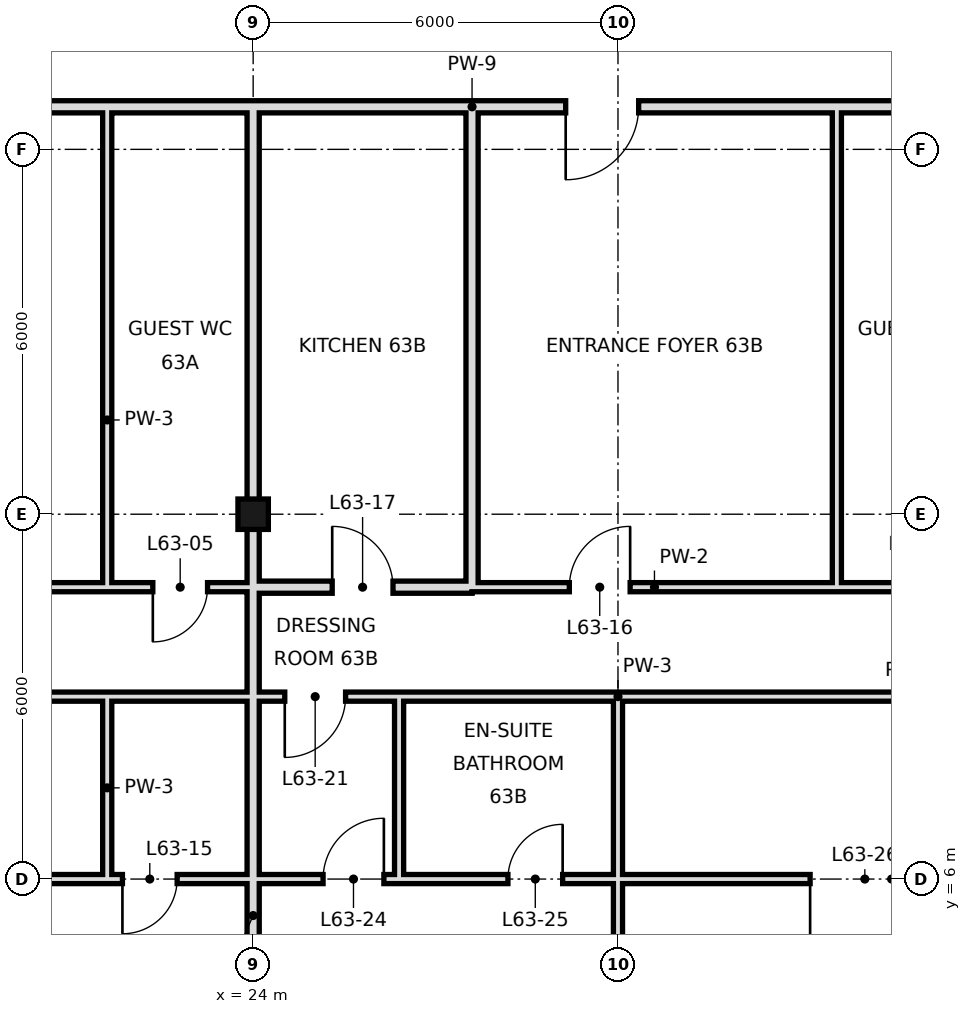
"""IFC4 building model, lengths in metres.
Left out: names, types, materials, properties, quantities, classifications, styles, units other than length and angle.
Written with IfcOpenShell. Run it as: python <this file> out.ifc"""

import sys

from ifc_helpers import new_model, si_unit, direction, frame, frame_2d, origin, origin_2d, place, context, subcontext, project, spatial, rectangle, hollow_rectangle, extrude, element, fill, save


model = new_model("IFC4")
c1 = context("Model", 3, precision=1e-05, world=origin(), true_north=direction((0.0, 1.0)))
c2 = subcontext(c1, "Body", "Model", "MODEL_VIEW")
j1 = project(units=[si_unit("LENGTHUNIT", "METRE"), si_unit("PLANEANGLEUNIT", "RADIAN")], contexts=[c1])
p1 = place(None, origin())
s1 = spatial("IfcSite", under=j1, at=p1, CompositionType="ELEMENT")
p2 = place(p1, origin())
s2 = spatial("IfcBuilding", under=s1, at=p2, CompositionType="ELEMENT")
p3 = place(p2, frame((0.0, 0.0, 266.6)))
s3 = spatial("IfcBuildingStorey", under=s2, at=p3, CompositionType="ELEMENT", Elevation=266.6)
p4 = place(p3, frame((24.0, 12.0, 0.0), z_axis=(0.0, 0.0, 1.0), x_axis=(1.0, 0.0, 0.0)))
e1 = element("IfcColumn", 1, at=p4, inside=s3, PredefinedType="COLUMN", context=c2, shape_type="SweptSolid", body=[
    extrude(hollow_rectangle(XDim=0.5, YDim=0.5, WallThickness=0.025, at=origin_2d()), origin(), (0.0, 0.0, 1.0), 3.6),
])
p5 = place(p3, frame((21.6, 6.0, 0.0), z_axis=(0.0, 0.0, 1.0), x_axis=(0.0, 1.0, 0.0)))
e2 = element("IfcWall", 2, at=p5, inside=s3, PredefinedType="PARTITIONING", context=c2, shape_type="SweptSolid", body=[
    extrude(rectangle(XDim=3.0, YDim=0.15, at=frame_2d((1.5, 0.0))), origin(), (0.0, 0.0, 1.0), 3.42),
])
p6 = place(p3, frame((21.6, 10.8, 0.0), z_axis=(0.0, 0.0, 1.0), x_axis=(0.0, 1.0, 0.0)))
e3 = element("IfcWall", 3, at=p6, inside=s3, PredefinedType="PARTITIONING", context=c2, shape_type="SweptSolid", body=[
    extrude(rectangle(XDim=7.9, YDim=0.15, at=frame_2d((3.95, 0.0))), origin(), (0.0, 0.0, 1.0), 3.42),
])
p7 = place(p3, frame((24.0, 10.8, 0.0), z_axis=(0.0, 0.0, 1.0), x_axis=(0.0, 1.0, 0.0)))
e4 = element("IfcWall", 4, at=p7, inside=s3, PredefinedType="SOLIDWALL", context=c2, shape_type="SweptSolid", body=[
    extrude(rectangle(XDim=7.9, YDim=0.2, at=frame_2d((3.95, 0.0))), origin(), (0.0, 0.0, 1.0), 2.72),
])
p8 = place(p3, frame((24.0, 0.0, 0.0), z_axis=(0.0, 0.0, 1.0), x_axis=(0.0, 1.0, 0.0)))
e5 = element("IfcWall", 5, at=p8, inside=s3, PredefinedType="SOLIDWALL", context=c2, shape_type="SweptSolid", body=[
    extrude(rectangle(XDim=10.8, YDim=0.2, at=frame_2d((5.4, 0.0))), origin(), (0.0, 0.0, 1.0), 2.72),
])
p9 = place(p3, frame((26.4, 6.0, 0.0), z_axis=(0.0, 0.0, 1.0), x_axis=(0.0, 1.0, 0.0)))
e6 = element("IfcWall", 6, at=p9, inside=s3, PredefinedType="PARTITIONING", context=c2, shape_type="SweptSolid", body=[
    extrude(rectangle(XDim=3.0, YDim=0.15, at=frame_2d((1.5, 0.0))), origin(), (0.0, 0.0, 1.0), 3.42),
])
p10 = place(p3, frame((27.6, 10.8, 0.0), z_axis=(0.0, 0.0, 1.0), x_axis=(0.0, 1.0, 0.0)))
e7 = element("IfcWall", 7, at=p10, inside=s3, PredefinedType="SOLIDWALL", context=c2, shape_type="SweptSolid", body=[
    extrude(rectangle(XDim=7.9, YDim=0.2, at=frame_2d((3.95, 0.0))), origin(), (0.0, 0.0, 1.0), 2.72),
])
p11 = place(p3, frame((30.0, -0.6, 0.0), z_axis=(0.0, 0.0, 1.0), x_axis=(0.0, 1.0, 0.0)))
e8 = element("IfcWall", 8, at=p11, inside=s3, PredefinedType="PARTITIONING", context=c2, shape_type="SweptSolid", body=[
    extrude(rectangle(XDim=6.6, YDim=0.15, at=frame_2d((3.3, 0.0))), origin(), (0.0, 0.0, 1.0), 2.72),
])
p12 = place(p3, frame((30.0, 6.0, 0.0), z_axis=(0.0, 0.0, 1.0), x_axis=(0.0, 1.0, 0.0)))
e9 = element("IfcWall", 9, at=p12, inside=s3, PredefinedType="PARTITIONING", context=c2, shape_type="SweptSolid", body=[
    extrude(rectangle(XDim=3.0, YDim=0.15, at=frame_2d((1.5, 0.0))), origin(), (0.0, 0.0, 1.0), 2.72),
])
p13 = place(p3, frame((33.6, 10.8, 0.0), z_axis=(0.0, 0.0, 1.0), x_axis=(0.0, 1.0, 0.0)))
e10 = element("IfcWall", 10, at=p13, inside=s3, PredefinedType="PARTITIONING", context=c2, shape_type="SweptSolid", body=[
    extrude(rectangle(XDim=7.9, YDim=0.15, at=frame_2d((3.95, 0.0))), origin(), (0.0, 0.0, 1.0), 3.42),
])
p14 = place(p3, frame((24.0, 10.8, 0.0), z_axis=(0.0, 0.0, 1.0), x_axis=(1.0, 0.0, 0.0)))
e11 = element("IfcWall", 11, at=p14, inside=s3, PredefinedType="SOLIDWALL", context=c2, shape_type="SweptSolid", body=[
    extrude(rectangle(XDim=3.6, YDim=0.2, at=frame_2d((1.8, 0.0))), origin(), (0.0, 0.0, 1.0), 2.72),
])
p15 = place(p14, frame((1.3, 0.0, 0.0)))
e12 = element("IfcOpeningElement", 12, at=p15, cuts=e11, PredefinedType="OPENING", context=c2, shape_type="SweptSolid", body=[
    extrude(rectangle(XDim=1.0, YDim=2.4, at=frame_2d((0.5, 1.2))), frame((0.0, 0.11, 0.0), z_axis=(0.0, -1.0, 0.0), x_axis=(1.0, 0.0, 0.0)), (0.0, 0.0, 1.0), 0.22),
])
p16 = place(p3, frame((-6.6, 10.8, 0.0), z_axis=(0.0, 0.0, 1.0), x_axis=(1.0, 0.0, 0.0)))
e13 = element("IfcWall", 13, at=p16, inside=s3, PredefinedType="PARTITIONING", context=c2, shape_type="SweptSolid", body=[
    extrude(rectangle(XDim=28.2, YDim=0.15, at=frame_2d((14.1, 0.0))), origin(), (0.0, 0.0, 1.0), 3.42),
])
p17 = place(p16, frame((25.6, 0.0, 0.0)))
e14 = element("IfcOpeningElement", 14, at=p17, cuts=e13, PredefinedType="OPENING", context=c2, shape_type="SweptSolid", body=[
    extrude(rectangle(XDim=1.0, YDim=2.4, at=frame_2d((0.5, 1.2))), frame((0.0, 0.085, 0.0), z_axis=(0.0, -1.0, 0.0), x_axis=(1.0, 0.0, 0.0)), (0.0, 0.0, 1.0), 0.17),
])
p18 = place(p16, frame((4.6, 0.0, 0.0)))
e15 = element("IfcOpeningElement", 15, at=p18, cuts=e13, PredefinedType="OPENING", context=c2, shape_type="SweptSolid", body=[
    extrude(rectangle(XDim=1.0, YDim=2.4, at=frame_2d((0.5, 1.2))), frame((0.0, 0.085, 0.0), z_axis=(0.0, -1.0, 0.0), x_axis=(1.0, 0.0, 0.0)), (0.0, 0.0, 1.0), 0.17),
])
p19 = place(p16, frame((15.7, 0.0, 0.0)))
e16 = element("IfcOpeningElement", 16, at=p19, cuts=e13, PredefinedType="OPENING", context=c2, shape_type="SweptSolid", body=[
    extrude(rectangle(XDim=1.0, YDim=2.4, at=frame_2d((0.5, 1.2))), frame((0.0, 0.085, 0.0), z_axis=(0.0, -1.0, 0.0), x_axis=(1.0, 0.0, 0.0)), (0.0, 0.0, 1.0), 0.17),
])
p20 = place(p3, frame((27.6, 10.8, 0.0), z_axis=(0.0, 0.0, 1.0), x_axis=(1.0, 0.0, 0.0)))
e17 = element("IfcWall", 17, at=p20, inside=s3, PredefinedType="PARTITIONING", context=c2, shape_type="SweptSolid", body=[
    extrude(rectangle(XDim=6.0, YDim=0.15, at=frame_2d((3.0, 0.0))), origin(), (0.0, 0.0, 1.0), 3.42),
])
p21 = place(p20, frame((1.6, 0.0, 0.0)))
e18 = element("IfcOpeningElement", 18, at=p21, cuts=e17, PredefinedType="OPENING", context=c2, shape_type="SweptSolid", body=[
    extrude(rectangle(XDim=1.0, YDim=2.4, at=frame_2d((0.5, 1.2))), frame((0.0, 0.085, 0.0), z_axis=(0.0, -1.0, 0.0), x_axis=(1.0, 0.0, 0.0)), (0.0, 0.0, 1.0), 0.17),
])
p22 = place(p3, frame((21.6, 10.8, 0.0), z_axis=(0.0, 0.0, 1.0), x_axis=(1.0, 0.0, 0.0)))
e19 = element("IfcWall", 19, at=p22, inside=s3, PredefinedType="PARTITIONING", context=c2, shape_type="SweptSolid", body=[
    extrude(rectangle(XDim=2.4, YDim=0.15, at=frame_2d((1.2, 0.0))), origin(), (0.0, 0.0, 1.0), 3.42),
])
p23 = place(p22, frame((0.75, 0.0, 0.0)))
e20 = element("IfcOpeningElement", 20, at=p23, cuts=e19, PredefinedType="OPENING", context=c2, shape_type="SweptSolid", body=[
    extrude(rectangle(XDim=0.9, YDim=2.4, at=frame_2d((0.45, 1.2))), frame((0.0, 0.085, 0.0), z_axis=(0.0, -1.0, 0.0), x_axis=(1.0, 0.0, 0.0)), (0.0, 0.0, 1.0), 0.17),
])
p24 = place(p3, frame((33.6, 10.8, 0.0), z_axis=(0.0, 0.0, 1.0), x_axis=(1.0, 0.0, 0.0)))
e21 = element("IfcWall", 21, at=p24, inside=s3, PredefinedType="PARTITIONING", context=c2, shape_type="SweptSolid", body=[
    extrude(rectangle(XDim=2.4, YDim=0.15, at=frame_2d((1.2, 0.0))), origin(), (0.0, 0.0, 1.0), 3.42),
])
p25 = place(p24, frame((0.95, 0.0, 0.0)))
e22 = element("IfcOpeningElement", 22, at=p25, cuts=e21, PredefinedType="OPENING", context=c2, shape_type="SweptSolid", body=[
    extrude(rectangle(XDim=0.9, YDim=2.4, at=frame_2d((0.45, 1.2))), frame((0.0, 0.085, 0.0), z_axis=(0.0, -1.0, 0.0), x_axis=(1.0, 0.0, 0.0)), (0.0, 0.0, 1.0), 0.17),
])
p26 = place(p3, frame((3.1, 18.7, 0.0), z_axis=(0.0, 0.0, 1.0), x_axis=(1.0, 0.0, 0.0)))
e23 = element("IfcWall", 23, at=p26, inside=s3, PredefinedType="SOLIDWALL", context=c2, shape_type="SweptSolid", body=[
    extrude(rectangle(XDim=20.9, YDim=0.2, at=frame_2d((10.45, 0.0))), origin(), (0.0, 0.0, 1.0), 2.72),
])
p27 = place(p26, frame((14.9, 0.0, 0.0)))
e24 = element("IfcOpeningElement", 24, at=p27, cuts=e23, PredefinedType="OPENING", context=c2, shape_type="SweptSolid", body=[
    extrude(rectangle(XDim=1.2, YDim=2.4, at=frame_2d((0.6, 1.2))), frame((0.0, 0.11, 0.0), z_axis=(0.0, -1.0, 0.0), x_axis=(1.0, 0.0, 0.0)), (0.0, 0.0, 1.0), 0.22),
])
p28 = place(p3, frame((27.6, 18.7, 0.0), z_axis=(0.0, 0.0, 1.0), x_axis=(1.0, 0.0, 0.0)))
e25 = element("IfcWall", 25, at=p28, inside=s3, PredefinedType="SOLIDWALL", context=c2, shape_type="SweptSolid", body=[
    extrude(rectangle(XDim=17.3, YDim=0.2, at=frame_2d((8.65, 0.0))), origin(), (0.0, 0.0, 1.0), 2.72),
])
p29 = place(p28, frame((1.54, 0.0, 0.0)))
e26 = element("IfcOpeningElement", 26, at=p29, cuts=e25, PredefinedType="OPENING", context=c2, shape_type="SweptSolid", body=[
    extrude(rectangle(XDim=1.2, YDim=2.4, at=frame_2d((0.6, 1.2))), frame((0.0, 0.11, 0.0), z_axis=(0.0, -1.0, 0.0), x_axis=(1.0, 0.0, 0.0)), (0.0, 0.0, 1.0), 0.22),
])
p30 = place(p3, frame((24.0, 18.7, 0.0), z_axis=(0.0, 0.0, 1.0), x_axis=(1.0, 0.0, 0.0)))
e27 = element("IfcWall", 27, at=p30, inside=s3, PredefinedType="SOLIDWALL", context=c2, shape_type="SweptSolid", body=[
    extrude(rectangle(XDim=3.6, YDim=0.2, at=frame_2d((1.8, 0.0))), origin(), (0.0, 0.0, 1.0), 3.42),
])
p31 = place(p3, frame((6.0, 6.0, 0.0), z_axis=(0.0, 0.0, 1.0), x_axis=(1.0, 0.0, 0.0)))
e28 = element("IfcWall", 28, at=p31, inside=s3, PredefinedType="PARTITIONING", context=c2, shape_type="SweptSolid", body=[
    extrude(rectangle(XDim=15.6, YDim=0.15, at=frame_2d((7.8, 0.0))), origin(), (0.0, 0.0, 1.0), 2.97),
])
p32 = place(p31, frame((7.04, 0.0, 0.0)))
e29 = element("IfcOpeningElement", 29, at=p32, cuts=e28, PredefinedType="OPENING", context=c2, shape_type="SweptSolid", body=[
    extrude(rectangle(XDim=1.8, YDim=2.4, at=frame_2d((0.9, 1.2))), frame((0.0, 0.085, 0.0), z_axis=(0.0, -1.0, 0.0), x_axis=(1.0, 0.0, 0.0)), (0.0, 0.0, 1.0), 0.17),
])
p33 = place(p31, frame((12.88, 0.0, 0.0)))
e30 = element("IfcOpeningElement", 30, at=p33, cuts=e28, PredefinedType="OPENING", context=c2, shape_type="SweptSolid", body=[
    extrude(rectangle(XDim=1.0, YDim=2.4, at=frame_2d((0.5, 1.2))), frame((0.0, 0.085, 0.0), z_axis=(0.0, -1.0, 0.0), x_axis=(1.0, 0.0, 0.0)), (0.0, 0.0, 1.0), 0.17),
])
p34 = place(p3, frame((24.0, 6.0, 0.0), z_axis=(0.0, 0.0, 1.0), x_axis=(1.0, 0.0, 0.0)))
e31 = element("IfcWall", 31, at=p34, inside=s3, PredefinedType="PARTITIONING", context=c2, shape_type="SweptSolid", body=[
    extrude(rectangle(XDim=2.4, YDim=0.15, at=frame_2d((1.2, 0.0))), origin(), (0.0, 0.0, 1.0), 2.97),
])
p35 = place(p34, frame((1.15, 0.0, 0.0)))
e32 = element("IfcOpeningElement", 32, at=p35, cuts=e31, PredefinedType="OPENING", context=c2, shape_type="SweptSolid", body=[
    extrude(rectangle(XDim=1.0, YDim=2.4, at=frame_2d((0.5, 1.2))), frame((0.0, 0.085, 0.0), z_axis=(0.0, -1.0, 0.0), x_axis=(1.0, 0.0, 0.0)), (0.0, 0.0, 1.0), 0.17),
])
p36 = place(p3, frame((30.0, 6.0, 0.0), z_axis=(0.0, 0.0, 1.0), x_axis=(1.0, 0.0, 0.0)))
e33 = element("IfcWall", 33, at=p36, inside=s3, PredefinedType="PARTITIONING", context=c2, shape_type="SweptSolid", body=[
    extrude(rectangle(XDim=15.6, YDim=0.15, at=frame_2d((7.8, 0.0))), origin(), (0.0, 0.0, 1.0), 2.97),
])
p37 = place(p36, frame((3.16, 0.0, 0.0)))
e34 = element("IfcOpeningElement", 34, at=p37, cuts=e33, PredefinedType="OPENING", context=c2, shape_type="SweptSolid", body=[
    extrude(rectangle(XDim=1.8, YDim=2.4, at=frame_2d((0.9, 1.2))), frame((0.0, 0.085, 0.0), z_axis=(0.0, -1.0, 0.0), x_axis=(1.0, 0.0, 0.0)), (0.0, 0.0, 1.0), 0.17),
])
p38 = place(p36, frame((12.88, 0.0, 0.0)))
e35 = element("IfcOpeningElement", 35, at=p38, cuts=e33, PredefinedType="OPENING", context=c2, shape_type="SweptSolid", body=[
    extrude(rectangle(XDim=1.0, YDim=2.4, at=frame_2d((0.5, 1.2))), frame((0.0, 0.085, 0.0), z_axis=(0.0, -1.0, 0.0), x_axis=(1.0, 0.0, 0.0)), (0.0, 0.0, 1.0), 0.17),
])
p39 = place(p3, frame((21.6, 6.0, 0.0), z_axis=(0.0, 0.0, 1.0), x_axis=(1.0, 0.0, 0.0)))
e36 = element("IfcWall", 36, at=p39, inside=s3, PredefinedType="PARTITIONING", context=c2, shape_type="SweptSolid", body=[
    extrude(rectangle(XDim=2.4, YDim=0.15, at=frame_2d((1.2, 0.0))), origin(), (0.0, 0.0, 1.0), 2.97),
])
p40 = place(p39, frame((0.25, 0.0, 0.0)))
e37 = element("IfcOpeningElement", 37, at=p40, cuts=e36, PredefinedType="OPENING", context=c2, shape_type="SweptSolid", body=[
    extrude(rectangle(XDim=0.9, YDim=2.4, at=frame_2d((0.45, 1.2))), frame((0.0, 0.085, 0.0), z_axis=(0.0, -1.0, 0.0), x_axis=(1.0, 0.0, 0.0)), (0.0, 0.0, 1.0), 0.17),
])
p41 = place(p3, frame((26.4, 6.0, 0.0), z_axis=(0.0, 0.0, 1.0), x_axis=(1.0, 0.0, 0.0)))
e38 = element("IfcWall", 38, at=p41, inside=s3, PredefinedType="PARTITIONING", context=c2, shape_type="SweptSolid", body=[
    extrude(rectangle(XDim=3.6, YDim=0.15, at=frame_2d((1.8, 0.0))), origin(), (0.0, 0.0, 1.0), 2.97),
])
p42 = place(p41, frame((1.79, 0.0, 0.0)))
e39 = element("IfcOpeningElement", 39, at=p42, cuts=e38, PredefinedType="OPENING", context=c2, shape_type="SweptSolid", body=[
    extrude(rectangle(XDim=0.9, YDim=2.4, at=frame_2d((0.45, 1.2))), frame((0.0, 0.085, 0.0), z_axis=(0.0, -1.0, 0.0), x_axis=(1.0, 0.0, 0.0)), (0.0, 0.0, 1.0), 0.17),
])
p43 = place(p3, frame((-3.6, 9.0, 0.0), z_axis=(0.0, 0.0, 1.0), x_axis=(1.0, 0.0, 0.0)))
e40 = element("IfcWall", 40, at=p43, inside=s3, PredefinedType="PARTITIONING", context=c2, shape_type="SweptSolid", body=[
    extrude(rectangle(XDim=25.2, YDim=0.15, at=frame_2d((12.6, 0.0))), origin(), (0.0, 0.0, 1.0), 3.42),
])
p44 = place(p43, frame((1.72, 0.0, 0.0)))
e41 = element("IfcOpeningElement", 41, at=p44, cuts=e40, PredefinedType="OPENING", context=c2, shape_type="SweptSolid", body=[
    extrude(rectangle(XDim=1.0, YDim=2.4, at=frame_2d((0.5, 1.2))), frame((0.0, 0.085, 0.0), z_axis=(0.0, -1.0, 0.0), x_axis=(1.0, 0.0, 0.0)), (0.0, 0.0, 1.0), 0.17),
])
p45 = place(p43, frame((7.0, 0.0, 0.0)))
e42 = element("IfcOpeningElement", 42, at=p45, cuts=e40, PredefinedType="OPENING", context=c2, shape_type="SweptSolid", body=[
    extrude(rectangle(XDim=1.0, YDim=2.4, at=frame_2d((0.5, 1.2))), frame((0.0, 0.085, 0.0), z_axis=(0.0, -1.0, 0.0), x_axis=(1.0, 0.0, 0.0)), (0.0, 0.0, 1.0), 0.17),
])
p46 = place(p43, frame((12.76, 0.0, 0.0)))
e43 = element("IfcOpeningElement", 43, at=p46, cuts=e40, PredefinedType="OPENING", context=c2, shape_type="SweptSolid", body=[
    extrude(rectangle(XDim=1.8, YDim=2.4, at=frame_2d((0.9, 1.2))), frame((0.0, 0.085, 0.0), z_axis=(0.0, -1.0, 0.0), x_axis=(1.0, 0.0, 0.0)), (0.0, 0.0, 1.0), 0.17),
])
p47 = place(p43, frame((22.48, 0.0, 0.0)))
e44 = element("IfcOpeningElement", 44, at=p47, cuts=e40, PredefinedType="OPENING", context=c2, shape_type="SweptSolid", body=[
    extrude(rectangle(XDim=1.0, YDim=2.4, at=frame_2d((0.5, 1.2))), frame((0.0, 0.085, 0.0), z_axis=(0.0, -1.0, 0.0), x_axis=(1.0, 0.0, 0.0)), (0.0, 0.0, 1.0), 0.17),
])
p48 = place(p3, frame((24.0, 9.0, 0.0), z_axis=(0.0, 0.0, 1.0), x_axis=(1.0, 0.0, 0.0)))
e45 = element("IfcWall", 45, at=p48, inside=s3, PredefinedType="PARTITIONING", context=c2, shape_type="SweptSolid", body=[
    extrude(rectangle(XDim=2.4, YDim=0.15, at=frame_2d((1.2, 0.0))), origin(), (0.0, 0.0, 1.0), 3.42),
])
p49 = place(p48, frame((0.52, 0.0, 0.0)))
e46 = element("IfcOpeningElement", 46, at=p49, cuts=e45, PredefinedType="OPENING", context=c2, shape_type="SweptSolid", body=[
    extrude(rectangle(XDim=1.0, YDim=2.4, at=frame_2d((0.5, 1.2))), frame((0.0, 0.085, 0.0), z_axis=(0.0, -1.0, 0.0), x_axis=(1.0, 0.0, 0.0)), (0.0, 0.0, 1.0), 0.17),
])
p50 = place(p3, frame((30.0, 9.0, 0.0), z_axis=(0.0, 0.0, 1.0), x_axis=(1.0, 0.0, 0.0)))
e47 = element("IfcWall", 47, at=p50, inside=s3, PredefinedType="PARTITIONING", context=c2, shape_type="SweptSolid", body=[
    extrude(rectangle(XDim=15.6, YDim=0.15, at=frame_2d((7.8, 0.0))), origin(), (0.0, 0.0, 1.0), 3.42),
])
p51 = place(p50, frame((5.1, 0.0, 0.0)))
e48 = element("IfcOpeningElement", 48, at=p51, cuts=e47, PredefinedType="OPENING", context=c2, shape_type="SweptSolid", body=[
    extrude(rectangle(XDim=1.8, YDim=2.4, at=frame_2d((0.9, 1.2))), frame((0.0, 0.085, 0.0), z_axis=(0.0, -1.0, 0.0), x_axis=(1.0, 0.0, 0.0)), (0.0, 0.0, 1.0), 0.17),
])
p52 = place(p50, frame((13.72, 0.0, 0.0)))
e49 = element("IfcOpeningElement", 49, at=p52, cuts=e47, PredefinedType="OPENING", context=c2, shape_type="SweptSolid", body=[
    extrude(rectangle(XDim=1.0, YDim=2.4, at=frame_2d((0.5, 1.2))), frame((0.0, 0.085, 0.0), z_axis=(0.0, -1.0, 0.0), x_axis=(1.0, 0.0, 0.0)), (0.0, 0.0, 1.0), 0.17),
])
p53 = place(p3, frame((21.6, 9.0, 0.0), z_axis=(0.0, 0.0, 1.0), x_axis=(1.0, 0.0, 0.0)))
e50 = element("IfcWall", 50, at=p53, inside=s3, PredefinedType="PARTITIONING", context=c2, shape_type="SweptSolid", body=[
    extrude(rectangle(XDim=2.4, YDim=0.15, at=frame_2d((1.2, 0.0))), origin(), (0.0, 0.0, 1.0), 3.42),
])
p54 = place(p3, frame((26.4, 9.0, 0.0), z_axis=(0.0, 0.0, 1.0), x_axis=(1.0, 0.0, 0.0)))
e51 = element("IfcWall", 51, at=p54, inside=s3, PredefinedType="PARTITIONING", context=c2, shape_type="SweptSolid", body=[
    extrude(rectangle(XDim=3.6, YDim=0.15, at=frame_2d((1.8, 0.0))), origin(), (0.0, 0.0, 1.0), 3.42),
])
p55 = place(p23, frame((0.9, 0.0, 0.0), z_axis=(0.0, 0.0, 1.0), x_axis=(-1.0, 0.0, 0.0)))
e52 = element("IfcDoor", 52, at=p55, inside=s3, OperationType="SINGLE_SWING_RIGHT", PredefinedType="DOOR", context=c2, shape_type="SweptSolid", body=[
    extrude(rectangle(XDim=0.9, YDim=2.4, at=frame_2d((0.45, 1.2))), frame((0.0, 0.025, 0.0), z_axis=(0.0, -1.0, 0.0), x_axis=(1.0, 0.0, 0.0)), (0.0, 0.0, 1.0), 0.05),
])
fill(e20, e52)
p56 = place(p40, frame((0.9, 0.0, 0.0), z_axis=(0.0, 0.0, 1.0), x_axis=(-1.0, 0.0, 0.0)))
e53 = element("IfcDoor", 53, at=p56, inside=s3, OperationType="SINGLE_SWING_RIGHT", PredefinedType="DOOR", context=c2, shape_type="SweptSolid", body=[
    extrude(rectangle(XDim=0.9, YDim=2.4, at=frame_2d((0.45, 1.2))), frame((0.0, 0.025, 0.0), z_axis=(0.0, -1.0, 0.0), x_axis=(1.0, 0.0, 0.0)), (0.0, 0.0, 1.0), 0.05),
])
fill(e37, e53)
p57 = place(p21, frame((1.0, 0.0, 0.0), z_axis=(0.0, 0.0, 1.0), x_axis=(-1.0, 0.0, 0.0)))
e54 = element("IfcDoor", 54, at=p57, inside=s3, OperationType="SINGLE_SWING_LEFT", PredefinedType="DOOR", context=c2, shape_type="SweptSolid", body=[
    extrude(rectangle(XDim=1.0, YDim=2.4, at=frame_2d((0.5, 1.2))), frame((0.0, 0.025, 0.0), z_axis=(0.0, -1.0, 0.0), x_axis=(1.0, 0.0, 0.0)), (0.0, 0.0, 1.0), 0.05),
])
fill(e18, e54)
p58 = place(p15, origin())
e55 = element("IfcDoor", 55, at=p58, inside=s3, OperationType="SINGLE_SWING_LEFT", PredefinedType="DOOR", context=c2, shape_type="SweptSolid", body=[
    extrude(rectangle(XDim=1.0, YDim=2.4, at=frame_2d((0.5, 1.2))), frame((0.0, 0.025, 0.0), z_axis=(0.0, -1.0, 0.0), x_axis=(1.0, 0.0, 0.0)), (0.0, 0.0, 1.0), 0.05),
])
fill(e12, e55)
p59 = place(p49, frame((1.0, 0.0, 0.0), z_axis=(0.0, 0.0, 1.0), x_axis=(-1.0, 0.0, 0.0)))
e56 = element("IfcDoor", 56, at=p59, inside=s3, OperationType="SINGLE_SWING_RIGHT", PredefinedType="DOOR", context=c2, shape_type="SweptSolid", body=[
    extrude(rectangle(XDim=1.0, YDim=2.4, at=frame_2d((0.5, 1.2))), frame((0.0, 0.025, 0.0), z_axis=(0.0, -1.0, 0.0), x_axis=(1.0, 0.0, 0.0)), (0.0, 0.0, 1.0), 0.05),
])
fill(e46, e56)
p60 = place(p35, frame((1.0, 0.0, 0.0), z_axis=(0.0, 0.0, 1.0), x_axis=(-1.0, 0.0, 0.0)))
e57 = element("IfcDoor", 57, at=p60, inside=s3, OperationType="SINGLE_SWING_LEFT", PredefinedType="DOOR", context=c2, shape_type="SweptSolid", body=[
    extrude(rectangle(XDim=1.0, YDim=2.4, at=frame_2d((0.5, 1.2))), frame((0.0, 0.025, 0.0), z_axis=(0.0, -1.0, 0.0), x_axis=(1.0, 0.0, 0.0)), (0.0, 0.0, 1.0), 0.05),
])
fill(e32, e57)
p61 = place(p42, frame((0.9, 0.0, 0.0), z_axis=(0.0, 0.0, 1.0), x_axis=(-1.0, 0.0, 0.0)))
e58 = element("IfcDoor", 58, at=p61, inside=s3, OperationType="SINGLE_SWING_LEFT", PredefinedType="DOOR", context=c2, shape_type="SweptSolid", body=[
    extrude(rectangle(XDim=0.9, YDim=2.4, at=frame_2d((0.45, 1.2))), frame((0.0, 0.025, 0.0), z_axis=(0.0, -1.0, 0.0), x_axis=(1.0, 0.0, 0.0)), (0.0, 0.0, 1.0), 0.05),
])
fill(e39, e58)
p62 = place(p37, frame((1.8, 0.0, 0.0), z_axis=(0.0, 0.0, 1.0), x_axis=(-1.0, 0.0, 0.0)))
e59 = element("IfcDoor", 59, at=p62, inside=s3, OperationType="SINGLE_SWING_RIGHT", PredefinedType="DOOR", context=c2, shape_type="SweptSolid", body=[
    extrude(rectangle(XDim=1.8, YDim=2.4, at=frame_2d((0.9, 1.2))), frame((0.0, 0.025, 0.0), z_axis=(0.0, -1.0, 0.0), x_axis=(1.0, 0.0, 0.0)), (0.0, 0.0, 1.0), 0.05),
])
fill(e34, e59)
p63 = place(p29, frame((1.2, 0.0, 0.0), z_axis=(0.0, 0.0, 1.0), x_axis=(-1.0, 0.0, 0.0)))
e60 = element("IfcDoor", 60, at=p63, inside=s3, OperationType="SINGLE_SWING_RIGHT", PredefinedType="DOOR", context=c2, shape_type="SweptSolid", body=[
    extrude(rectangle(XDim=1.2, YDim=2.4, at=frame_2d((0.6, 1.2))), frame((0.0, 0.025, 0.0), z_axis=(0.0, -1.0, 0.0), x_axis=(1.0, 0.0, 0.0)), (0.0, 0.0, 1.0), 0.05),
])
fill(e26, e60)
save(model, sys.argv[1])
